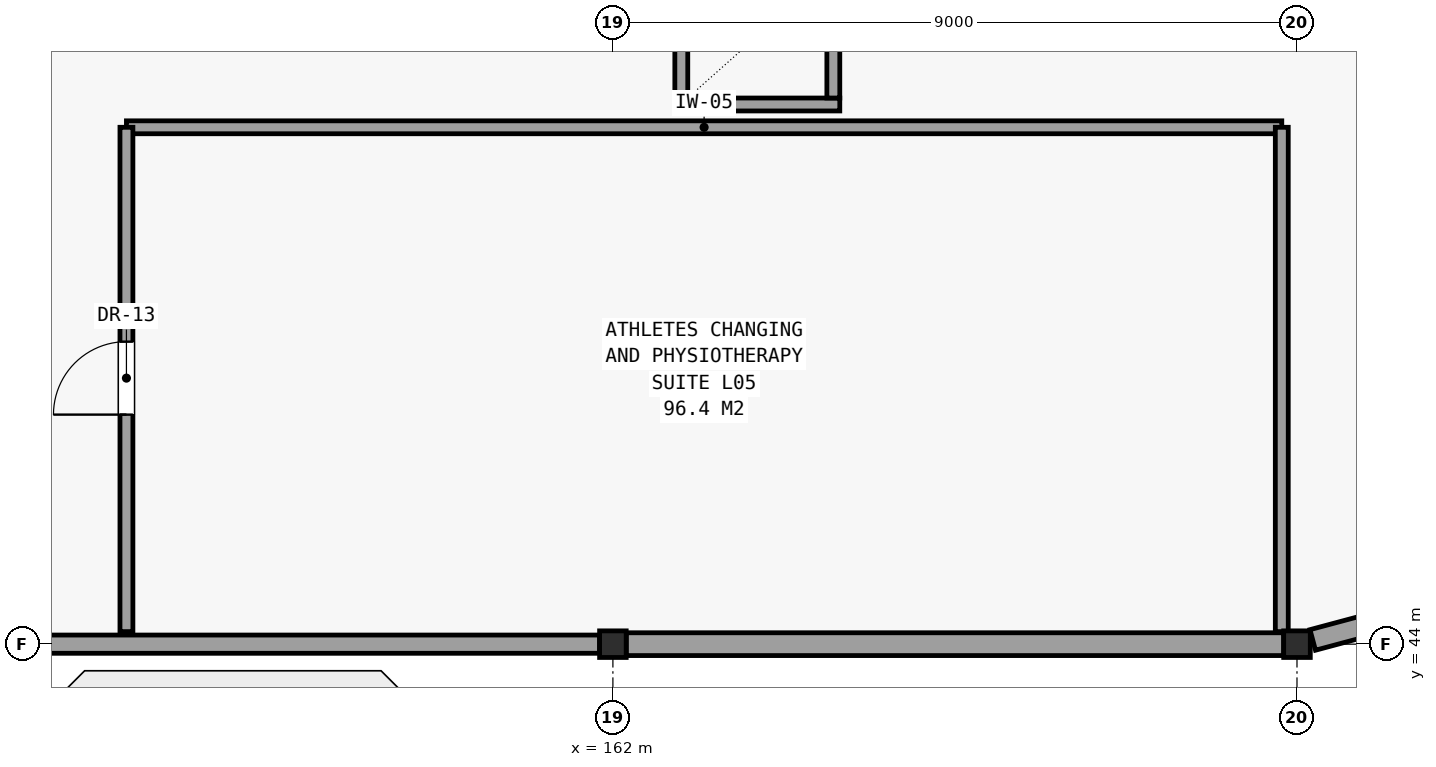
"""IFC4 building model, lengths in metres.
Left out: names, types, materials, properties, quantities, classifications, styles, units other than length and angle.
Written with IfcOpenShell. Run it as: python <this file> out.ifc"""

import sys

from ifc_helpers import new_model, si_unit, direction, frame, frame_2d, origin, origin_2d, place, context, subcontext, project, spatial, rectangle, hollow_rectangle, extrude, element, fill, save


model = new_model("IFC4")
c1 = context("Model", 3, precision=1e-05, world=origin(), true_north=direction((0.0, 1.0)))
c2 = subcontext(c1, "Body", "Model", "MODEL_VIEW")
j1 = project(units=[si_unit("LENGTHUNIT", "METRE"), si_unit("PLANEANGLEUNIT", "RADIAN")], contexts=[c1])
p1 = place(None, origin())
s1 = spatial("IfcSite", under=j1, at=p1, CompositionType="ELEMENT")
p2 = place(p1, origin())
s2 = spatial("IfcBuilding", under=s1, at=p2, CompositionType="ELEMENT")
p3 = place(p2, frame((0.0, 0.0, 21.9)))
s3 = spatial("IfcBuildingStorey", under=s2, at=p3, CompositionType="ELEMENT", Elevation=21.9)
for number, where, z_axis, x_axis in (
    (1, (162.0, 44.0, 0.0), (0.0, 0.0, 1.0), (1.0, 0.0, 0.0)),
    (2, (171.0, 44.0, 0.0), (0.0, 0.0, 1.0), (1.0, 0.0, 0.0)),
):
    element("IfcColumn", number, at=place(p3, frame(where, z_axis=z_axis, x_axis=x_axis)), inside=s3, PredefinedType="COLUMN", context=c2, shape_type="SweptSolid", body=[
        extrude(hollow_rectangle(XDim=0.35, YDim=0.35, WallThickness=0.016, at=origin_2d()), origin(), (0.0, 0.0, 1.0), 4.2),
    ])
p4 = place(p3, frame((153.175, 44.0, 0.0), z_axis=(0.0, 0.0, 1.0), x_axis=(1.0, 0.0, 0.0)))
e3 = element("IfcWall", 3, at=p4, inside=s3, PredefinedType="SOLIDWALL", context=c2, shape_type="SweptSolid", body=[
    extrude(rectangle(XDim=8.65, YDim=0.24, at=frame_2d((4.325, 0.0))), origin(), (0.0, 0.0, 1.0), 3.29),
])
p5 = place(p3, frame((162.175, 44.0, 0.0), z_axis=(0.0, 0.0, 1.0), x_axis=(1.0, 0.0, 0.0)))
e4 = element("IfcWall", 4, at=p5, inside=s3, PredefinedType="SOLIDWALL", context=c2, shape_type="SweptSolid", body=[
    extrude(rectangle(XDim=8.65, YDim=0.3, at=frame_2d((4.325, 0.0))), origin(), (0.0, 0.0, 1.0), 3.29),
])
p6 = place(p3, frame((171.207, 44.055, 0.0), z_axis=(0.0, 0.0, 1.0), x_axis=(0.965924589415, 0.258823661135, 0.0)))
e5 = element("IfcWall", 5, at=p6, inside=s3, PredefinedType="SOLIDWALL", context=c2, shape_type="SweptSolid", body=[
    extrude(rectangle(XDim=4.227, YDim=0.28, at=frame_2d((2.113, 0.0))), origin(), (0.0, 0.0, 1.0), 3.29),
])
p7 = place(p3, frame((162.815, 51.1, 0.0), z_axis=(0.0, 0.0, 1.0), x_axis=(1.0, 0.0, 0.0)))
e6 = element("IfcWall", 6, at=p7, inside=s3, PredefinedType="PARTITIONING", context=c2, shape_type="SweptSolid", body=[
    extrude(rectangle(XDim=2.17, YDim=0.17, at=frame_2d((1.085, 0.0))), origin(), (0.0, 0.0, 1.0), 3.92),
])
for number, where, z_axis, x_axis in (
    (7, (162.9, 51.185, 0.0), (0.0, 0.0, 1.0), (0.0, 1.0, 0.0)),
    (8, (164.9, 51.185, 0.0), (0.0, 0.0, 1.0), (0.0, 1.0, 0.0)),
):
    element("IfcWall", number, at=place(p3, frame(where, z_axis=z_axis, x_axis=x_axis)), inside=s3, PredefinedType="PARTITIONING", context=c2, shape_type="SweptSolid", body=[
        extrude(rectangle(XDim=1.63, YDim=0.17, at=frame_2d((0.815, 0.0))), origin(), (0.0, 0.0, 1.0), 3.24),
    ])
p8 = place(p3, frame((155.6, 50.8, 0.0), z_axis=(0.0, 0.0, 1.0), x_axis=(1.0, 0.0, 0.0)))
e9 = element("IfcWall", 9, at=p8, inside=s3, PredefinedType="PARTITIONING", context=c2, shape_type="SweptSolid", body=[
    extrude(rectangle(XDim=15.2, YDim=0.17, at=frame_2d((7.6, 0.0))), origin(), (0.0, 0.0, 1.0), 3.29),
])
p9 = place(p3, frame((155.6, 44.165, 0.0), z_axis=(0.0, 0.0, 1.0), x_axis=(0.0, 1.0, 0.0)))
e10 = element("IfcWall", 10, at=p9, inside=s3, PredefinedType="PARTITIONING", context=c2, shape_type="SweptSolid", body=[
    extrude(rectangle(XDim=6.635, YDim=0.17, at=frame_2d((3.317, 0.0))), origin(), (0.0, 0.0, 1.0), 3.44),
])
p10 = place(p9, frame((2.855, 0.0, 0.0)))
e11 = element("IfcOpeningElement", 11, at=p10, cuts=e10, PredefinedType="OPENING", context=c2, shape_type="SweptSolid", body=[
    extrude(rectangle(XDim=0.96, YDim=2.2, at=frame_2d((0.48, 1.1))), frame((0.0, 0.096, 0.0), z_axis=(0.0, -1.0, 0.0), x_axis=(1.0, 0.0, 0.0)), (0.0, 0.0, 1.0), 0.192),
])
p11 = place(p3, frame((170.8, 44.165, 0.0), z_axis=(0.0, 0.0, 1.0), x_axis=(0.0, 1.0, 0.0)))
e12 = element("IfcWall", 12, at=p11, inside=s3, PredefinedType="PARTITIONING", context=c2, shape_type="SweptSolid", body=[
    extrude(rectangle(XDim=6.635, YDim=0.17, at=frame_2d((3.317, 0.0))), origin(), (0.0, 0.0, 1.0), 3.29),
])
p12 = place(p10, origin())
e13 = element("IfcDoor", 13, at=p12, inside=s3, OperationType="SINGLE_SWING_LEFT", PredefinedType="DOOR", context=c2, shape_type="SweptSolid", body=[
    extrude(rectangle(XDim=0.96, YDim=2.2, at=frame_2d((0.48, 1.1))), frame((0.0, 0.025, 0.0), z_axis=(0.0, -1.0, 0.0), x_axis=(1.0, 0.0, 0.0)), (0.0, 0.0, 1.0), 0.05),
])
fill(e11, e13)
save(model, sys.argv[1])
